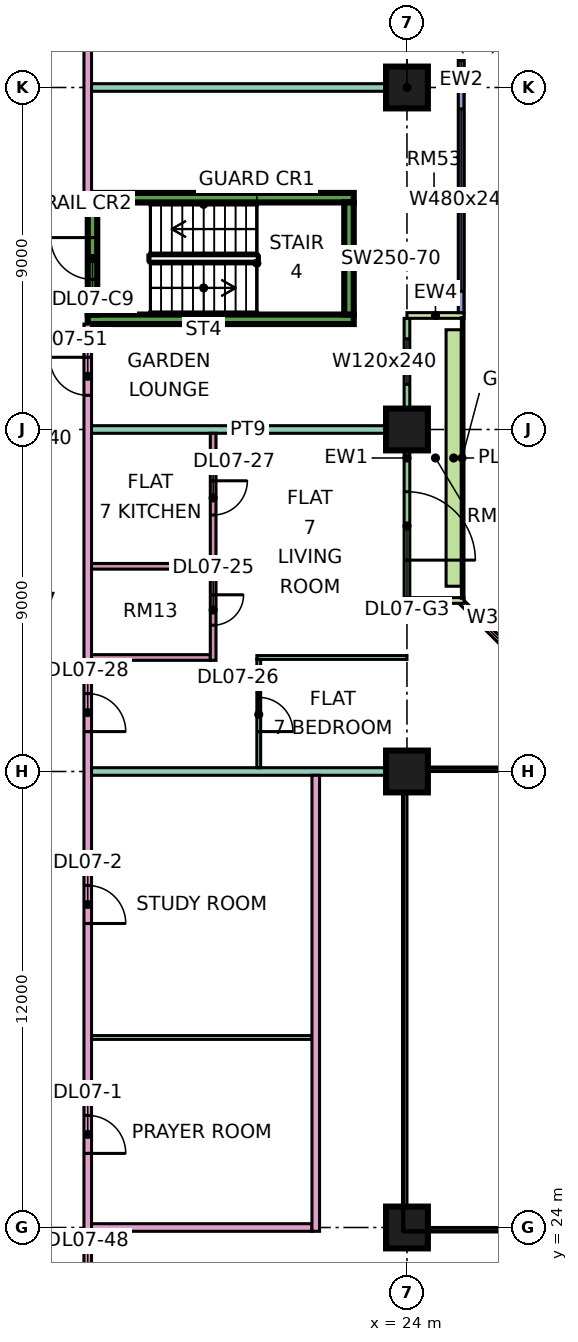
"""IFC4 building model, lengths in metres.
Left out: names, types, materials, properties, quantities, classifications, styles, units other than length and angle.
Written with IfcOpenShell. Run it as: python <this file> out.ifc"""

import sys

from ifc_helpers import new_model, si_unit, direction, frame, frame_2d, origin, origin_2d, place, context, subcontext, project, spatial, rectangle, extrude, element, fill, save


model = new_model("IFC4")
c1 = context("Model", 3, precision=1e-05, world=origin(), true_north=direction((0.0, 1.0)))
c2 = subcontext(c1, "Body", "Model", "MODEL_VIEW")
j1 = project(units=[si_unit("LENGTHUNIT", "METRE"), si_unit("PLANEANGLEUNIT", "RADIAN")], contexts=[c1])
p1 = place(None, origin())
s1 = spatial("IfcSite", under=j1, at=p1, CompositionType="ELEMENT")
p2 = place(p1, origin())
s2 = spatial("IfcBuilding", under=s1, at=p2, CompositionType="ELEMENT")
p3 = place(p2, frame((0.0, 0.0, 41.4)))
s3 = spatial("IfcBuildingStorey", under=s2, at=p3, CompositionType="ELEMENT", Elevation=41.4)
for number, where, z_axis, x_axis in (
    (1, (24.0, 24.0, 0.0), (0.0, 0.0, 1.0), (1.0, 0.0, 0.0)),
    (2, (24.0, 36.0, 0.0), (0.0, 0.0, 1.0), (1.0, 0.0, 0.0)),
    (3, (24.0, 45.0, 0.0), (0.0, 0.0, 1.0), (1.0, 0.0, 0.0)),
    (4, (24.0, 54.0, 0.0), (0.0, 0.0, 1.0), (1.0, 0.0, 0.0)),
):
    element("IfcColumn", number, at=place(p3, frame(where, z_axis=z_axis, x_axis=x_axis)), inside=s3, PredefinedType="COLUMN", context=c2, shape_type="SweptSolid", body=[
        extrude(rectangle(XDim=1.1, YDim=1.1, at=origin_2d()), origin(), (0.0, 0.0, 1.0), 3.75),
    ])
for number, where, z_axis, x_axis in (
    (5, (15.6, 47.9, 0.0), (0.0, 0.0, 1.0), (1.0, 0.0, 0.0)),
    (6, (15.6, 51.1, 0.0), (0.0, 0.0, 1.0), (1.0, 0.0, 0.0)),
):
    element("IfcWall", number, at=place(p3, frame(where, z_axis=z_axis, x_axis=x_axis)), inside=s3, PredefinedType="SHEAR", context=c2, shape_type="SweptSolid", body=[
        extrude(rectangle(XDim=7.0, YDim=0.25, at=frame_2d((3.5, 0.0))), origin(), (0.0, 0.0, 1.0), 3.75),
    ])
p4 = place(p3, frame((15.725, 48.025, 0.0), z_axis=(0.0, 0.0, 1.0), x_axis=(0.0, 1.0, 0.0)))
e7 = element("IfcWall", 7, at=p4, inside=s3, PredefinedType="SHEAR", context=c2, shape_type="SweptSolid", body=[
    extrude(rectangle(XDim=2.95, YDim=0.25, at=frame_2d((1.475, 0.0))), origin(), (0.0, 0.0, 1.0), 3.75),
])
p5 = place(p4, frame((0.925, 0.0, 0.0)))
e8 = element("IfcOpeningElement", 8, at=p5, cuts=e7, PredefinedType="OPENING", context=c2, shape_type="SweptSolid", body=[
    extrude(rectangle(XDim=1.1, YDim=2.2, at=frame_2d((0.55, 1.1))), frame((0.0, 0.135, 0.0), z_axis=(0.0, -1.0, 0.0), x_axis=(1.0, 0.0, 0.0)), (0.0, 0.0, 1.0), 0.27),
])
p6 = place(p3, frame((22.475, 48.025, 0.0), z_axis=(0.0, 0.0, 1.0), x_axis=(0.0, 1.0, 0.0)))
e9 = element("IfcWall", 9, at=p6, inside=s3, PredefinedType="SHEAR", context=c2, shape_type="SweptSolid", body=[
    extrude(rectangle(XDim=2.95, YDim=0.25, at=frame_2d((1.475, 0.0))), origin(), (0.0, 0.0, 1.0), 3.75),
])
p7 = place(p3, frame((28.447, 37.447, 0.0), z_axis=(0.0, 0.0, 1.0), x_axis=(-0.707106781187, 0.707106781187, 0.0)))
e10 = element("IfcWall", 10, at=p7, inside=s3, PredefinedType="SOLIDWALL", context=c2, shape_type="SweptSolid", body=[
    extrude(rectangle(XDim=4.243, YDim=0.15, at=frame_2d((2.121, 0.0))), origin(), (0.0, 0.0, 1.0), 3.35),
])
p8 = place(p7, frame((0.621, 0.0, 0.45)))
e11 = element("IfcOpeningElement", 11, at=p8, cuts=e10, PredefinedType="OPENING", context=c2, shape_type="SweptSolid", body=[
    extrude(rectangle(XDim=3.0, YDim=2.4, at=frame_2d((1.5, 1.2))), frame((0.0, 0.085, 0.0), z_axis=(0.0, -1.0, 0.0), x_axis=(1.0, 0.0, 0.0)), (0.0, 0.0, 1.0), 0.17),
])
p9 = place(p3, frame((24.0, 40.575, 0.0), z_axis=(0.0, 0.0, 1.0), x_axis=(0.0, 1.0, 0.0)))
e12 = element("IfcWall", 12, at=p9, inside=s3, PredefinedType="SOLIDWALL", context=c2, shape_type="SweptSolid", body=[
    extrude(rectangle(XDim=7.35, YDim=0.15, at=frame_2d((3.675, 0.0))), origin(), (0.0, 0.0, 1.0), 3.35),
])
p10 = place(p9, frame((0.988, 0.0, 0.0)))
e13 = element("IfcOpeningElement", 13, at=p10, cuts=e12, PredefinedType="OPENING", context=c2, shape_type="SweptSolid", body=[
    extrude(rectangle(XDim=1.8, YDim=2.4, at=frame_2d((0.9, 1.2))), frame((0.0, 0.085, 0.0), z_axis=(0.0, -1.0, 0.0), x_axis=(1.0, 0.0, 0.0)), (0.0, 0.0, 1.0), 0.17),
])
p11 = place(p9, frame((5.613, 0.0, 0.45)))
e14 = element("IfcOpeningElement", 14, at=p11, cuts=e12, PredefinedType="OPENING", context=c2, shape_type="SweptSolid", body=[
    extrude(rectangle(XDim=1.2, YDim=2.4, at=frame_2d((0.6, 1.2))), frame((0.0, 0.085, 0.0), z_axis=(0.0, -1.0, 0.0), x_axis=(1.0, 0.0, 0.0)), (0.0, 0.0, 1.0), 0.17),
])
for number, where, z_axis, x_axis in (
    (15, (25.5, 40.5, 0.0), (0.0, 0.0, 1.0), (-1.0, 0.0, 0.0)),
    (16, (25.5, 48.0, 0.0), (0.0, 0.0, 1.0), (-1.0, 0.0, 0.0)),
):
    element("IfcWall", number, at=place(p3, frame(where, z_axis=z_axis, x_axis=x_axis)), inside=s3, PredefinedType="SOLIDWALL", context=c2, shape_type="SweptSolid", body=[
        extrude(rectangle(XDim=1.5, YDim=0.15, at=frame_2d((0.75, 0.0))), origin(), (0.0, 0.0, 1.0), 3.35),
    ])
p12 = place(p3, frame((25.425, 48.075, 0.0), z_axis=(0.0, 0.0, 1.0), x_axis=(0.0, 1.0, 0.0)))
e17 = element("IfcWall", 17, at=p12, inside=s3, PredefinedType="SOLIDWALL", context=c2, shape_type="SweptSolid", body=[
    extrude(rectangle(XDim=13.425, YDim=0.15, at=frame_2d((6.712, 0.0))), origin(), (0.0, 0.0, 1.0), 3.35),
])
p13 = place(p12, frame((0.562, 0.0, 0.45)))
e18 = element("IfcOpeningElement", 18, at=p13, cuts=e17, PredefinedType="OPENING", context=c2, shape_type="SweptSolid", body=[
    extrude(rectangle(XDim=4.8, YDim=2.4, at=frame_2d((2.4, 1.2))), frame((0.0, 0.085, 0.0), z_axis=(0.0, -1.0, 0.0), x_axis=(1.0, 0.0, 0.0)), (0.0, 0.0, 1.0), 0.17),
])
p14 = place(p12, frame((7.425, 0.0, 0.45)))
e19 = element("IfcOpeningElement", 19, at=p14, cuts=e17, PredefinedType="OPENING", context=c2, shape_type="SweptSolid", body=[
    extrude(rectangle(XDim=3.0, YDim=2.4, at=frame_2d((1.5, 1.2))), frame((0.0, 0.085, 0.0), z_axis=(0.0, -1.0, 0.0), x_axis=(1.0, 0.0, 0.0)), (0.0, 0.0, 1.0), 0.17),
])
p15 = place(p12, frame((12.225, 0.0, 0.45)))
e20 = element("IfcOpeningElement", 20, at=p15, cuts=e17, PredefinedType="OPENING", context=c2, shape_type="SweptSolid", body=[
    extrude(rectangle(XDim=0.9, YDim=2.4, at=frame_2d((0.45, 1.2))), frame((0.0, 0.085, 0.0), z_axis=(0.0, -1.0, 0.0), x_axis=(1.0, 0.0, 0.0)), (0.0, 0.0, 1.0), 0.17),
])
p16 = place(p3, frame((25.229, 40.875, 0.0), z_axis=(0.0, 0.0, 1.0), x_axis=(0.0, 1.0, 0.0)))
e21 = element("IfcWall", 21, at=p16, inside=s3, PredefinedType="SOLIDWALL", context=c2, shape_type="SweptSolid", body=[
    extrude(rectangle(XDim=6.75, YDim=0.4, at=frame_2d((3.375, 0.0))), origin(), (0.0, 0.0, 1.0), 0.7),
])
p17 = place(p3, frame((15.6, 20.0, 0.0), z_axis=(0.0, 0.0, 1.0), x_axis=(0.0, 1.0, 0.0)))
e22 = element("IfcWall", 22, at=p17, inside=s3, PredefinedType="PARTITIONING", context=c2, shape_type="SweptSolid", body=[
    extrude(rectangle(XDim=27.775, YDim=0.2, at=frame_2d((13.887, 0.0))), origin(), (0.0, 0.0, 1.0), 3.35),
])
p18 = place(p17, frame((5.95, 0.0, 0.0)))
e23 = element("IfcOpeningElement", 23, at=p18, cuts=e22, PredefinedType="OPENING", context=c2, shape_type="SweptSolid", body=[
    extrude(rectangle(XDim=1.0, YDim=2.1, at=frame_2d((0.5, 1.05))), frame((0.0, 0.11, 0.0), z_axis=(0.0, -1.0, 0.0), x_axis=(1.0, 0.0, 0.0)), (0.0, 0.0, 1.0), 0.22),
])
p19 = place(p17, frame((12.0, 0.0, 0.0)))
e24 = element("IfcOpeningElement", 24, at=p19, cuts=e22, PredefinedType="OPENING", context=c2, shape_type="SweptSolid", body=[
    extrude(rectangle(XDim=1.0, YDim=2.1, at=frame_2d((0.5, 1.05))), frame((0.0, 0.11, 0.0), z_axis=(0.0, -1.0, 0.0), x_axis=(1.0, 0.0, 0.0)), (0.0, 0.0, 1.0), 0.22),
])
p20 = place(p17, frame((17.05, 0.0, 0.0)))
e25 = element("IfcOpeningElement", 25, at=p20, cuts=e22, PredefinedType="OPENING", context=c2, shape_type="SweptSolid", body=[
    extrude(rectangle(XDim=1.0, YDim=2.1, at=frame_2d((0.5, 1.05))), frame((0.0, 0.11, 0.0), z_axis=(0.0, -1.0, 0.0), x_axis=(1.0, 0.0, 0.0)), (0.0, 0.0, 1.0), 0.22),
])
p21 = place(p17, frame((1.15, 0.0, 0.0)))
e26 = element("IfcOpeningElement", 26, at=p21, cuts=e22, PredefinedType="OPENING", context=c2, shape_type="SweptSolid", body=[
    extrude(rectangle(XDim=1.8, YDim=2.1, at=frame_2d((0.9, 1.05))), frame((0.0, 0.11, 0.0), z_axis=(0.0, -1.0, 0.0), x_axis=(1.0, 0.0, 0.0)), (0.0, 0.0, 1.0), 0.22),
])
p22 = place(p17, frame((25.9, 0.0, 0.0)))
e27 = element("IfcOpeningElement", 27, at=p22, cuts=e22, PredefinedType="OPENING", context=c2, shape_type="SweptSolid", body=[
    extrude(rectangle(XDim=1.0, YDim=2.1, at=frame_2d((0.5, 1.05))), frame((0.0, 0.11, 0.0), z_axis=(0.0, -1.0, 0.0), x_axis=(1.0, 0.0, 0.0)), (0.0, 0.0, 1.0), 0.22),
])
p23 = place(p3, frame((15.6, 51.225, 0.0), z_axis=(0.0, 0.0, 1.0), x_axis=(0.0, 1.0, 0.0)))
e28 = element("IfcWall", 28, at=p23, inside=s3, PredefinedType="PARTITIONING", context=c2, shape_type="SweptSolid", body=[
    extrude(rectangle(XDim=11.701, YDim=0.2, at=frame_2d((5.851, 0.0))), origin(), (0.0, 0.0, 1.0), 3.35),
])
p24 = place(p23, frame((4.125, 0.0, 0.0)))
e29 = element("IfcOpeningElement", 29, at=p24, cuts=e28, PredefinedType="OPENING", context=c2, shape_type="SweptSolid", body=[
    extrude(rectangle(XDim=1.0, YDim=2.1, at=frame_2d((0.5, 1.05))), frame((0.0, 0.11, 0.0), z_axis=(0.0, -1.0, 0.0), x_axis=(1.0, 0.0, 0.0)), (0.0, 0.0, 1.0), 0.22),
])
p25 = place(p3, frame((15.7, 24.0, 0.0), z_axis=(0.0, 0.0, 1.0), x_axis=(1.0, 0.0, 0.0)))
e30 = element("IfcWall", 30, at=p25, inside=s3, PredefinedType="PARTITIONING", context=c2, shape_type="SweptSolid", body=[
    extrude(rectangle(XDim=5.8, YDim=0.2, at=frame_2d((2.9, 0.0))), origin(), (0.0, 0.0, 1.0), 3.35),
])
p26 = place(p3, frame((15.7, 29.0, 0.0), z_axis=(0.0, 0.0, 1.0), x_axis=(1.0, 0.0, 0.0)))
e31 = element("IfcWall", 31, at=p26, inside=s3, PredefinedType="PARTITIONING", context=c2, shape_type="SweptSolid", body=[
    extrude(rectangle(XDim=5.8, YDim=0.1, at=frame_2d((2.9, 0.0))), origin(), (0.0, 0.0, 1.0), 3.35),
])
p27 = place(p3, frame((15.7, 36.0, 0.0), z_axis=(0.0, 0.0, 1.0), x_axis=(1.0, 0.0, 0.0)))
e32 = element("IfcWall", 32, at=p27, inside=s3, PredefinedType="PARTITIONING", context=c2, shape_type="SweptSolid", body=[
    extrude(rectangle(XDim=8.3, YDim=0.2, at=frame_2d((4.15, 0.0))), origin(), (0.0, 0.0, 1.0), 3.35),
])
for number, where, z_axis, x_axis in (
    (33, (15.7, 39.0, 0.0), (0.0, 0.0, 1.0), (1.0, 0.0, 0.0)),
    (34, (15.7, 41.4, 0.0), (0.0, 0.0, 1.0), (1.0, 0.0, 0.0)),
):
    element("IfcWall", number, at=place(p3, frame(where, z_axis=z_axis, x_axis=x_axis)), inside=s3, PredefinedType="PARTITIONING", context=c2, shape_type="SweptSolid", body=[
        extrude(rectangle(XDim=3.125, YDim=0.15, at=frame_2d((1.562, 0.0))), origin(), (0.0, 0.0, 1.0), 3.35),
    ])
p28 = place(p3, frame((15.7, 45.0, 0.0), z_axis=(0.0, 0.0, 1.0), x_axis=(1.0, 0.0, 0.0)))
e35 = element("IfcWall", 35, at=p28, inside=s3, PredefinedType="PARTITIONING", context=c2, shape_type="SweptSolid", body=[
    extrude(rectangle(XDim=8.226, YDim=0.2, at=frame_2d((4.113, 0.0))), origin(), (0.0, 0.0, 1.0), 3.35),
])
p29 = place(p3, frame((15.7, 54.0, 0.0), z_axis=(0.0, 0.0, 1.0), x_axis=(1.0, 0.0, 0.0)))
e36 = element("IfcWall", 36, at=p29, inside=s3, PredefinedType="PARTITIONING", context=c2, shape_type="SweptSolid", body=[
    extrude(rectangle(XDim=8.3, YDim=0.2, at=frame_2d((4.15, 0.0))), origin(), (0.0, 0.0, 1.0), 3.35),
])
p30 = place(p3, frame((18.9, 38.925, 0.0), z_axis=(0.0, 0.0, 1.0), x_axis=(0.0, 1.0, 0.0)))
e37 = element("IfcWall", 37, at=p30, inside=s3, PredefinedType="PARTITIONING", context=c2, shape_type="SweptSolid", body=[
    extrude(rectangle(XDim=5.975, YDim=0.15, at=frame_2d((2.987, 0.0))), origin(), (0.0, 0.0, 1.0), 3.35),
])
p31 = place(p30, frame((0.925, 0.0, 0.0)))
e38 = element("IfcOpeningElement", 38, at=p31, cuts=e37, PredefinedType="OPENING", context=c2, shape_type="SweptSolid", body=[
    extrude(rectangle(XDim=0.8, YDim=2.1, at=frame_2d((0.4, 1.05))), frame((0.0, 0.085, 0.0), z_axis=(0.0, -1.0, 0.0), x_axis=(1.0, 0.0, 0.0)), (0.0, 0.0, 1.0), 0.17),
])
p32 = place(p30, frame((3.825, 0.0, 0.0)))
e39 = element("IfcOpeningElement", 39, at=p32, cuts=e37, PredefinedType="OPENING", context=c2, shape_type="SweptSolid", body=[
    extrude(rectangle(XDim=0.9, YDim=2.1, at=frame_2d((0.45, 1.05))), frame((0.0, 0.085, 0.0), z_axis=(0.0, -1.0, 0.0), x_axis=(1.0, 0.0, 0.0)), (0.0, 0.0, 1.0), 0.17),
])
p33 = place(p3, frame((20.05, 39.0, 0.0), z_axis=(0.0, 0.0, 1.0), x_axis=(1.0, 0.0, 0.0)))
e40 = element("IfcWall", 40, at=p33, inside=s3, PredefinedType="PARTITIONING", context=c2, shape_type="SweptSolid", body=[
    extrude(rectangle(XDim=3.95, YDim=0.1, at=frame_2d((1.975, 0.0))), origin(), (0.0, 0.0, 1.0), 3.35),
])
p34 = place(p3, frame((20.1, 36.1, 0.0), z_axis=(0.0, 0.0, 1.0), x_axis=(0.0, 1.0, 0.0)))
e41 = element("IfcWall", 41, at=p34, inside=s3, PredefinedType="PARTITIONING", context=c2, shape_type="SweptSolid", body=[
    extrude(rectangle(XDim=2.85, YDim=0.1, at=frame_2d((1.425, 0.0))), origin(), (0.0, 0.0, 1.0), 3.35),
])
p35 = place(p34, frame((0.95, 0.0, 0.0)))
e42 = element("IfcOpeningElement", 42, at=p35, cuts=e41, PredefinedType="OPENING", context=c2, shape_type="SweptSolid", body=[
    extrude(rectangle(XDim=0.9, YDim=2.1, at=frame_2d((0.45, 1.05))), frame((0.0, 0.06, 0.0), z_axis=(0.0, -1.0, 0.0), x_axis=(1.0, 0.0, 0.0)), (0.0, 0.0, 1.0), 0.12),
])
p36 = place(p3, frame((21.6, 23.9, 0.0), z_axis=(0.0, 0.0, 1.0), x_axis=(0.0, 1.0, 0.0)))
e43 = element("IfcWall", 43, at=p36, inside=s3, PredefinedType="PARTITIONING", context=c2, shape_type="SweptSolid", body=[
    extrude(rectangle(XDim=12.0, YDim=0.2, at=frame_2d((6.0, 0.0))), origin(), (0.0, 0.0, 1.0), 3.35),
])
p37 = place(p8, origin())
e44 = element("IfcWindow", 44, at=p37, inside=s3, PartitioningType="SINGLE_PANEL", PredefinedType="WINDOW", context=c2, shape_type="SweptSolid", body=[
    extrude(rectangle(XDim=3.0, YDim=2.4, at=frame_2d((1.5, 1.2))), frame((0.0, 0.03, 0.0), z_axis=(0.0, -1.0, 0.0), x_axis=(1.0, 0.0, 0.0)), (0.0, 0.0, 1.0), 0.06),
])
fill(e11, e44)
p38 = place(p10, frame((1.8, 0.0, 0.0), z_axis=(0.0, 0.0, 1.0), x_axis=(-1.0, 0.0, 0.0)))
e45 = element("IfcDoor", 45, at=p38, inside=s3, OperationType="DOUBLE_DOOR_SINGLE_SWING", PredefinedType="DOOR", context=c2, shape_type="SweptSolid", body=[
    extrude(rectangle(XDim=1.8, YDim=2.4, at=frame_2d((0.9, 1.2))), frame((0.0, 0.025, 0.0), z_axis=(0.0, -1.0, 0.0), x_axis=(1.0, 0.0, 0.0)), (0.0, 0.0, 1.0), 0.05),
])
fill(e13, e45)
p39 = place(p11, origin())
e46 = element("IfcWindow", 46, at=p39, inside=s3, PartitioningType="SINGLE_PANEL", PredefinedType="WINDOW", context=c2, shape_type="SweptSolid", body=[
    extrude(rectangle(XDim=1.2, YDim=2.4, at=frame_2d((0.6, 1.2))), frame((0.0, 0.03, 0.0), z_axis=(0.0, -1.0, 0.0), x_axis=(1.0, 0.0, 0.0)), (0.0, 0.0, 1.0), 0.06),
])
fill(e14, e46)
p40 = place(p13, origin())
e47 = element("IfcWindow", 47, at=p40, inside=s3, PartitioningType="SINGLE_PANEL", PredefinedType="WINDOW", context=c2, shape_type="SweptSolid", body=[
    extrude(rectangle(XDim=4.8, YDim=2.4, at=frame_2d((2.4, 1.2))), frame((0.0, 0.03, 0.0), z_axis=(0.0, -1.0, 0.0), x_axis=(1.0, 0.0, 0.0)), (0.0, 0.0, 1.0), 0.06),
])
fill(e18, e47)
p41 = place(p5, frame((1.1, 0.0, 0.0), z_axis=(0.0, 0.0, 1.0), x_axis=(-1.0, 0.0, 0.0)))
e48 = element("IfcDoor", 48, at=p41, inside=s3, OperationType="SINGLE_SWING_RIGHT", PredefinedType="DOOR", context=c2, shape_type="SweptSolid", body=[
    extrude(rectangle(XDim=1.1, YDim=2.2, at=frame_2d((0.55, 1.1))), frame((0.0, 0.025, 0.0), z_axis=(0.0, -1.0, 0.0), x_axis=(1.0, 0.0, 0.0)), (0.0, 0.0, 1.0), 0.05),
])
fill(e8, e48)
p42 = place(p18, frame((1.0, 0.0, 0.0), z_axis=(0.0, 0.0, 1.0), x_axis=(-1.0, 0.0, 0.0)))
e49 = element("IfcDoor", 49, at=p42, inside=s3, OperationType="SINGLE_SWING_LEFT", PredefinedType="DOOR", context=c2, shape_type="SweptSolid", body=[
    extrude(rectangle(XDim=1.0, YDim=2.1, at=frame_2d((0.5, 1.05))), frame((0.0, 0.025, 0.0), z_axis=(0.0, -1.0, 0.0), x_axis=(1.0, 0.0, 0.0)), (0.0, 0.0, 1.0), 0.05),
])
fill(e23, e49)
p43 = place(p19, frame((1.0, 0.0, 0.0), z_axis=(0.0, 0.0, 1.0), x_axis=(-1.0, 0.0, 0.0)))
e50 = element("IfcDoor", 50, at=p43, inside=s3, OperationType="SINGLE_SWING_LEFT", PredefinedType="DOOR", context=c2, shape_type="SweptSolid", body=[
    extrude(rectangle(XDim=1.0, YDim=2.1, at=frame_2d((0.5, 1.05))), frame((0.0, 0.025, 0.0), z_axis=(0.0, -1.0, 0.0), x_axis=(1.0, 0.0, 0.0)), (0.0, 0.0, 1.0), 0.05),
])
fill(e24, e50)
p44 = place(p31, origin())
e51 = element("IfcDoor", 51, at=p44, inside=s3, OperationType="SINGLE_SWING_RIGHT", PredefinedType="DOOR", context=c2, shape_type="SweptSolid", body=[
    extrude(rectangle(XDim=0.8, YDim=2.1, at=frame_2d((0.4, 1.05))), frame((0.0, 0.025, 0.0), z_axis=(0.0, -1.0, 0.0), x_axis=(1.0, 0.0, 0.0)), (0.0, 0.0, 1.0), 0.05),
])
fill(e38, e51)
p45 = place(p35, frame((0.9, 0.0, 0.0), z_axis=(0.0, 0.0, 1.0), x_axis=(-1.0, 0.0, 0.0)))
e52 = element("IfcDoor", 52, at=p45, inside=s3, OperationType="SINGLE_SWING_LEFT", PredefinedType="DOOR", context=c2, shape_type="SweptSolid", body=[
    extrude(rectangle(XDim=0.9, YDim=2.1, at=frame_2d((0.45, 1.05))), frame((0.0, 0.025, 0.0), z_axis=(0.0, -1.0, 0.0), x_axis=(1.0, 0.0, 0.0)), (0.0, 0.0, 1.0), 0.05),
])
fill(e42, e52)
p46 = place(p32, origin())
e53 = element("IfcDoor", 53, at=p46, inside=s3, OperationType="SINGLE_SWING_RIGHT", PredefinedType="DOOR", context=c2, shape_type="SweptSolid", body=[
    extrude(rectangle(XDim=0.9, YDim=2.1, at=frame_2d((0.45, 1.05))), frame((0.0, 0.025, 0.0), z_axis=(0.0, -1.0, 0.0), x_axis=(1.0, 0.0, 0.0)), (0.0, 0.0, 1.0), 0.05),
])
fill(e39, e53)
p47 = place(p20, frame((1.0, 0.0, 0.0), z_axis=(0.0, 0.0, 1.0), x_axis=(-1.0, 0.0, 0.0)))
e54 = element("IfcDoor", 54, at=p47, inside=s3, OperationType="SINGLE_SWING_LEFT", PredefinedType="DOOR", context=c2, shape_type="SweptSolid", body=[
    extrude(rectangle(XDim=1.0, YDim=2.1, at=frame_2d((0.5, 1.05))), frame((0.0, 0.025, 0.0), z_axis=(0.0, -1.0, 0.0), x_axis=(1.0, 0.0, 0.0)), (0.0, 0.0, 1.0), 0.05),
])
fill(e25, e54)
p48 = place(p22, frame((1.0, 0.0, 0.0), z_axis=(0.0, 0.0, 1.0), x_axis=(-1.0, 0.0, 0.0)))
e55 = element("IfcDoor", 55, at=p48, inside=s3, OperationType="SINGLE_SWING_RIGHT", PredefinedType="DOOR", context=c2, shape_type="SweptSolid", body=[
    extrude(rectangle(XDim=1.0, YDim=2.1, at=frame_2d((0.5, 1.05))), frame((0.0, 0.025, 0.0), z_axis=(0.0, -1.0, 0.0), x_axis=(1.0, 0.0, 0.0)), (0.0, 0.0, 1.0), 0.05),
])
fill(e27, e55)
save(model, sys.argv[1])
